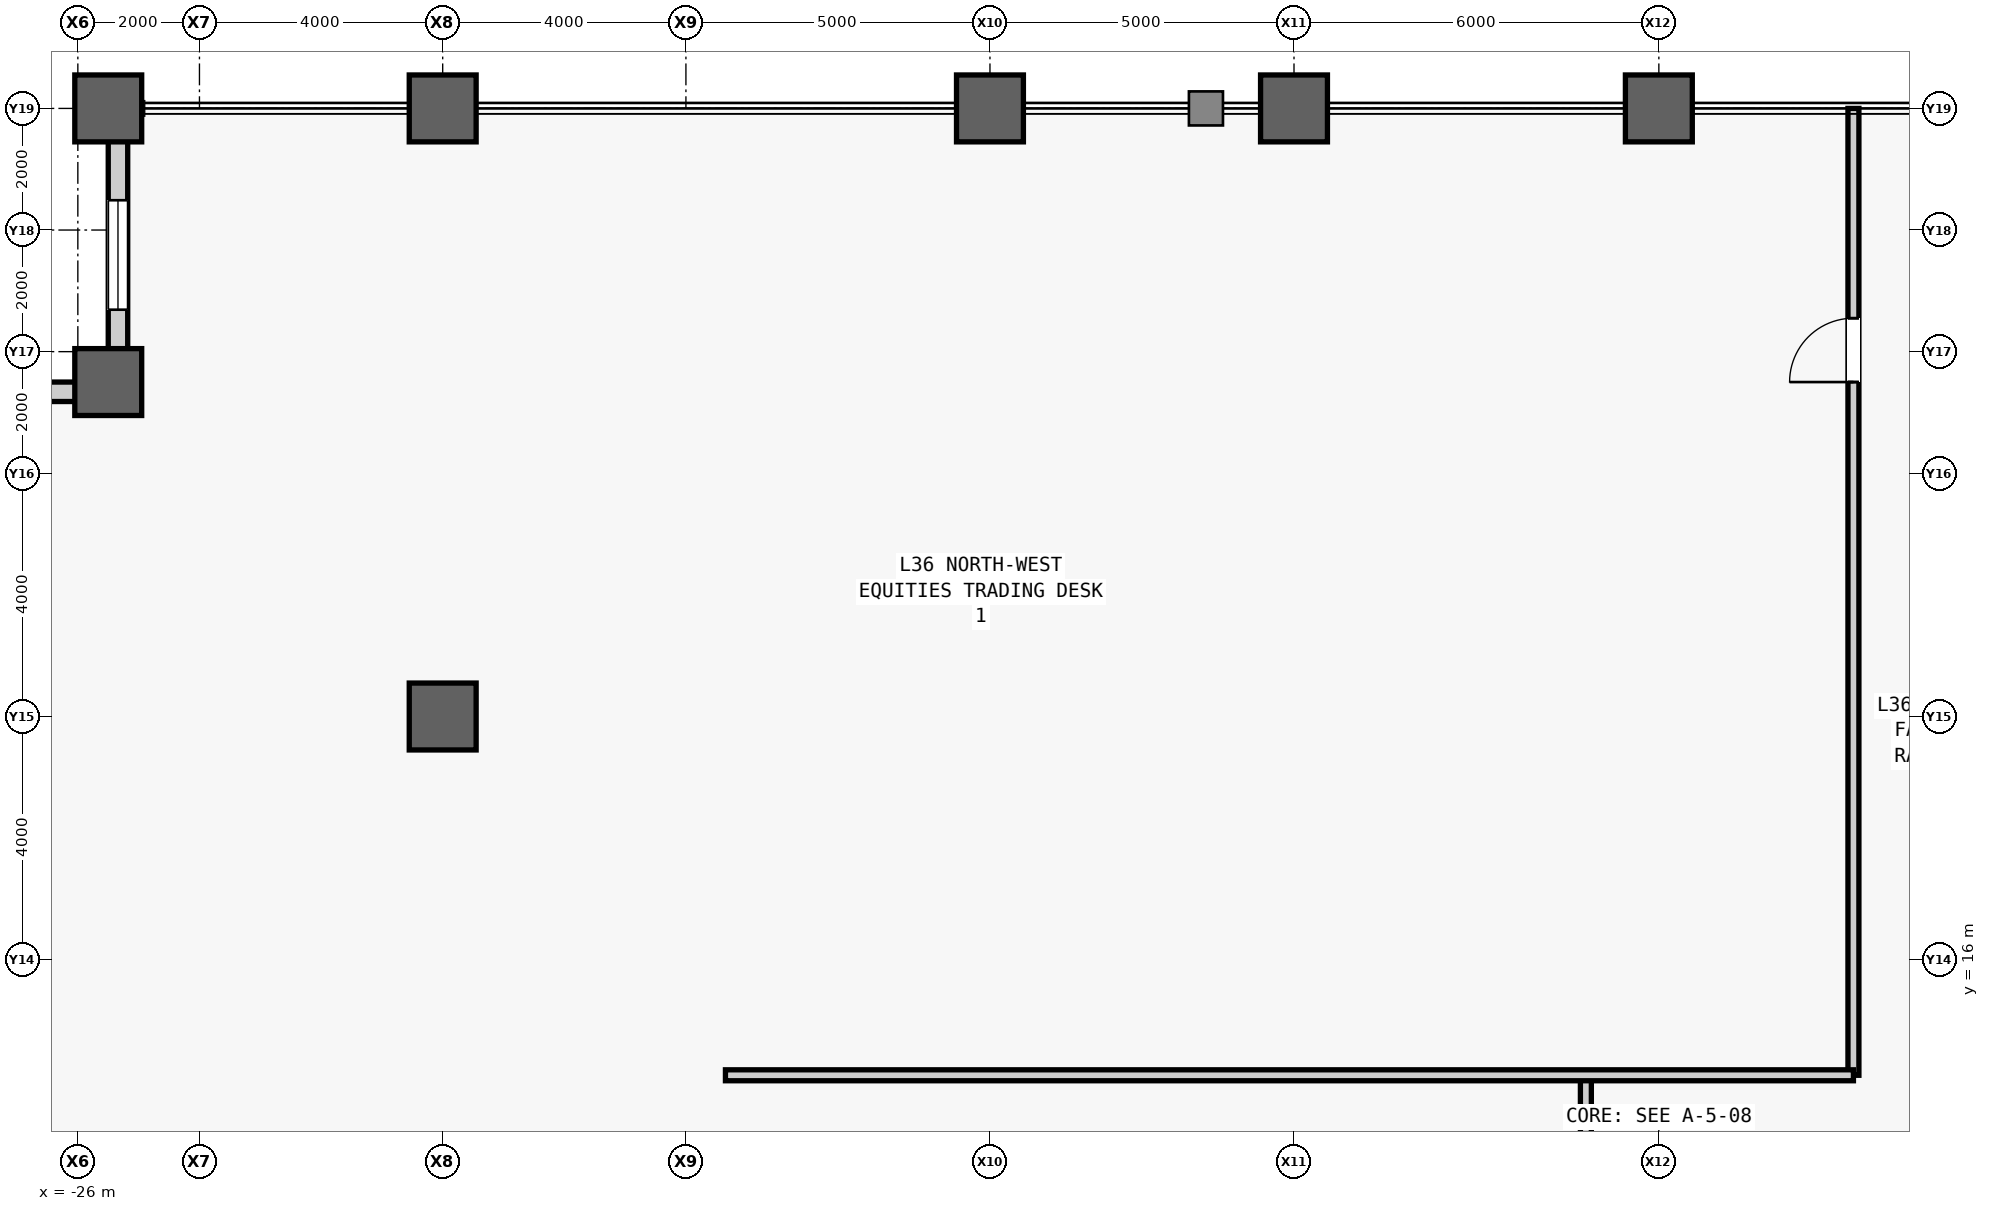
"""IFC4 building model, lengths in metres.
Left out: names, types, materials, properties, quantities, classifications, styles, units other than length and angle.
Written with IfcOpenShell. Run it as: python <this file> out.ifc"""

import sys

from ifc_helpers import new_model, si_unit, direction, frame, frame_2d, origin, origin_2d, place, context, subcontext, project, spatial, rectangle, hollow_rectangle, extrude, source, transform, mapped, element, fill, save


model = new_model("IFC4")
c1 = context("Model", 3, precision=1e-05, world=origin(), true_north=direction((0.0, 1.0)))
c2 = subcontext(c1, "Body", "Model", "MODEL_VIEW")
j1 = project(units=[si_unit("LENGTHUNIT", "METRE"), si_unit("PLANEANGLEUNIT", "RADIAN")], contexts=[c1])
p1 = place(None, origin())
s1 = spatial("IfcSite", under=j1, at=p1, CompositionType="ELEMENT")
p2 = place(p1, origin())
s2 = spatial("IfcBuilding", under=s1, at=p2, CompositionType="ELEMENT")
p3 = place(p2, frame((0.0, 0.0, 159.1)))
s3 = spatial("IfcBuildingStorey", under=s2, at=p3, CompositionType="ELEMENT", Elevation=159.1)
m1 = source(origin(), c2, "Body", "SweptSolid", [
    extrude(hollow_rectangle(XDim=1.1, YDim=1.1, WallThickness=0.06, at=origin_2d()), origin(), (0.0, 0.0, 1.0), 4.0),
])
for number, where, z_axis, x_axis in (
    (1, (-25.5, 25.5, 0.0), (0.0, 0.0, 1.0), (1.0, 0.0, 0.0)),
    (2, (-25.5, 30.0, 0.0), (0.0, 0.0, 1.0), (1.0, 0.0, 0.0)),
    (3, (-20.0, 20.0, 0.0), (0.0, 0.0, 1.0), (1.0, 0.0, 0.0)),
    (4, (-20.0, 30.0, 0.0), (0.0, 0.0, 1.0), (1.0, 0.0, 0.0)),
    (5, (-11.0, 30.0, 0.0), (0.0, 0.0, 1.0), (1.0, 0.0, 0.0)),
    (6, (-6.0, 30.0, 0.0), (0.0, 0.0, 1.0), (1.0, 0.0, 0.0)),
    (7, (0.0, 30.0, 0.0), (0.0, 0.0, 1.0), (1.0, 0.0, 0.0)),
):
    element("IfcColumn", number, at=place(p3, frame(where, z_axis=z_axis, x_axis=x_axis)), inside=s3, PredefinedType="COLUMN", context=c2, shape_type="MappedRepresentation", body=[
        mapped(m1, transform((0.0, 0.0, 0.0), scale=1.0)),
    ])
m2 = source(origin(), c2, "Body", "SweptSolid", [
    extrude(rectangle(XDim=4.18, YDim=0.32, at=frame_2d((2.09, 0.0))), origin(), (0.0, 0.0, 1.0), 3.164),
])
p4 = place(p3, frame((-25.34, 25.5, 0.0), z_axis=(0.0, 0.0, 1.0), x_axis=(0.0, 1.0, 0.0)))
e8 = element("IfcWall", 8, at=p4, inside=s3, PredefinedType="STANDARD", context=c2, shape_type="MappedRepresentation", body=[
    mapped(m2, transform((0.0, 0.0, 0.0), scale=1.0)),
])
m3 = source(origin(), c2, "Body", "SweptSolid", [
    extrude(rectangle(XDim=1.8, YDim=2.4, at=frame_2d((0.9, 1.2))), frame((0.0, 0.17, 0.0), z_axis=(0.0, -1.0, 0.0), x_axis=(1.0, 0.0, 0.0)), (0.0, 0.0, 1.0), 0.34),
])
p5 = place(p4, frame((1.19, 0.0, 0.5)))
e9 = element("IfcOpeningElement", 9, at=p5, cuts=e8, PredefinedType="OPENING", context=c2, shape_type="MappedRepresentation", body=[
    mapped(m3, transform((0.0, 0.0, 0.0), scale=1.0)),
])
p6 = place(p3, frame((-25.5, 25.34, 0.0), z_axis=(0.0, 0.0, 1.0), x_axis=(-1.0, 0.0, 0.0)))
e10 = element("IfcWall", 10, at=p6, inside=s3, PredefinedType="STANDARD", context=c2, shape_type="MappedRepresentation", body=[
    mapped(m2, transform((0.0, 0.0, 0.0), scale=1.0)),
])
p7 = place(p6, frame((1.19, 0.0, 0.5)))
e11 = element("IfcOpeningElement", 11, at=p7, cuts=e10, PredefinedType="OPENING", context=c2, shape_type="MappedRepresentation", body=[
    mapped(m3, transform((0.0, 0.0, 0.0), scale=1.0)),
])
m4 = source(origin(), c2, "Body", "SweptSolid", [
    extrude(rectangle(XDim=3.1, YDim=0.18, at=frame_2d((1.55, 0.0))), origin(), (0.0, 0.0, 1.0), 3.78),
])
p8 = place(p3, frame((-1.2, 11.0, 0.0), z_axis=(0.0, 0.0, 1.0), x_axis=(0.0, 1.0, 0.0)))
e12 = element("IfcWall", 12, at=p8, inside=s3, PredefinedType="PARTITIONING", context=c2, shape_type="MappedRepresentation", body=[
    mapped(m4, transform((0.0, 0.0, 0.0), scale=1.0)),
])
m5 = source(origin(), c2, "Body", "SweptSolid", [
    extrude(rectangle(XDim=15.9, YDim=0.18, at=frame_2d((7.95, 0.0))), origin(), (0.0, 0.0, 1.0), 3.78),
])
p9 = place(p3, frame((3.2, 14.1, 0.0), z_axis=(0.0, 0.0, 1.0), x_axis=(0.0, 1.0, 0.0)))
e13 = element("IfcWall", 13, at=p9, inside=s3, PredefinedType="PARTITIONING", context=c2, shape_type="MappedRepresentation", body=[
    mapped(m5, transform((0.0, 0.0, 0.0), scale=1.0)),
])
m6 = source(origin(), c2, "Body", "SweptSolid", [
    extrude(rectangle(XDim=1.05, YDim=2.2, at=frame_2d((0.525, 1.1))), frame((0.0, 0.1, 0.0), z_axis=(0.0, -1.0, 0.0), x_axis=(1.0, 0.0, 0.0)), (0.0, 0.0, 1.0), 0.2),
])
p10 = place(p9, frame((11.4, 0.0, 0.0)))
e14 = element("IfcOpeningElement", 14, at=p10, cuts=e13, PredefinedType="OPENING", context=c2, shape_type="MappedRepresentation", body=[
    mapped(m6, transform((0.0, 0.0, 0.0), scale=1.0)),
])
m7 = source(origin(), c2, "Body", "SweptSolid", [
    extrude(rectangle(XDim=18.55, YDim=0.18, at=frame_2d((9.275, 0.0))), origin(), (0.0, 0.0, 1.0), 3.78),
])
p11 = place(p3, frame((-15.35, 14.1, 0.0), z_axis=(0.0, 0.0, 1.0), x_axis=(1.0, 0.0, 0.0)))
e15 = element("IfcWall", 15, at=p11, inside=s3, PredefinedType="PARTITIONING", context=c2, shape_type="MappedRepresentation", body=[
    mapped(m7, transform((0.0, 0.0, 0.0), scale=1.0)),
])
m8 = source(origin(), c2, "Body", "SweptSolid", [
    extrude(rectangle(XDim=1.8, YDim=2.4, at=frame_2d((0.9, 1.2))), frame((0.0, 0.03, 0.0), z_axis=(0.0, -1.0, 0.0), x_axis=(1.0, 0.0, 0.0)), (0.0, 0.0, 1.0), 0.06),
])
p12 = place(p5, origin())
e16 = element("IfcWindow", 16, at=p12, inside=s3, PartitioningType="SINGLE_PANEL", PredefinedType="WINDOW", context=c2, shape_type="MappedRepresentation", body=[
    mapped(m8, transform((0.0, 0.0, 0.0), scale=1.0)),
])
fill(e9, e16)
m9 = source(origin(), c2, "Body", "SweptSolid", [
    extrude(rectangle(XDim=1.05, YDim=2.2, at=frame_2d((0.525, 1.1))), frame((0.0, 0.025, 0.0), z_axis=(0.0, -1.0, 0.0), x_axis=(1.0, 0.0, 0.0)), (0.0, 0.0, 1.0), 0.05),
])
p13 = place(p10, origin())
e17 = element("IfcDoor", 17, at=p13, inside=s3, OperationType="SINGLE_SWING_LEFT", PredefinedType="DOOR", context=c2, shape_type="MappedRepresentation", body=[
    mapped(m9, transform((0.0, 0.0, 0.0), scale=1.0)),
])
fill(e14, e17)
save(model, sys.argv[1])
